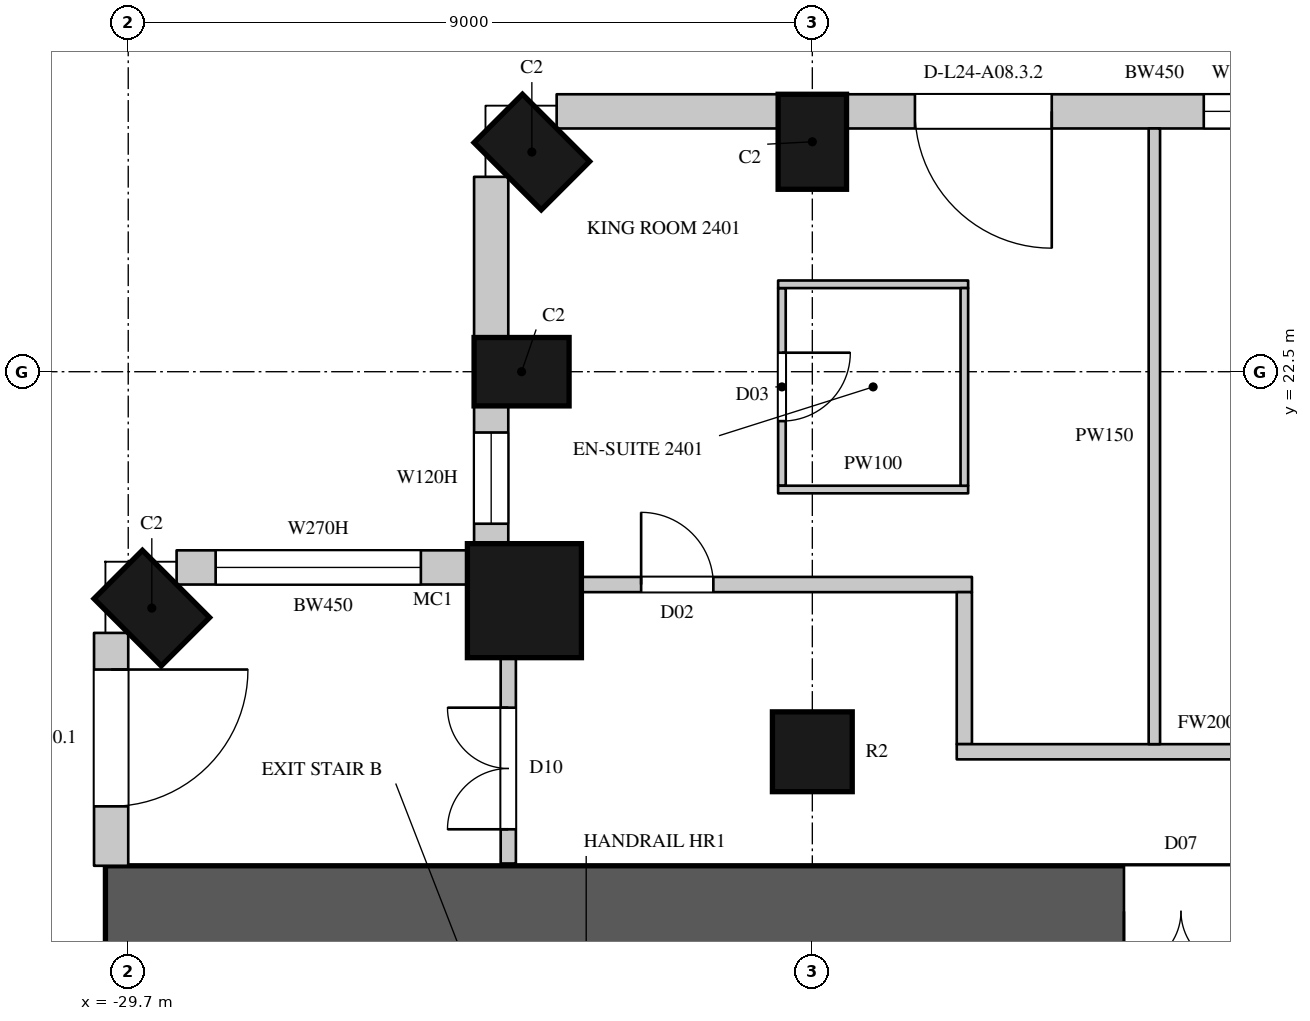
"""IFC4 building model, lengths in metres.
Left out: names, types, materials, properties, quantities, classifications, styles, units other than length and angle.
Written with IfcOpenShell. Run it as: python <this file> out.ifc"""

import sys

from ifc_helpers import new_model, si_unit, direction, frame, frame_2d, origin, origin_2d, place, context, subcontext, project, spatial, rectangle, circle, extrude, element, fill, save


model = new_model("IFC4")
c1 = context("Model", 3, precision=1e-05, world=origin(), true_north=direction((0.0, 1.0)))
c2 = subcontext(c1, "Body", "Model", "MODEL_VIEW")
j1 = project(units=[si_unit("LENGTHUNIT", "METRE"), si_unit("PLANEANGLEUNIT", "RADIAN")], contexts=[c1])
p1 = place(None, origin())
s1 = spatial("IfcSite", under=j1, at=p1, CompositionType="ELEMENT")
p2 = place(p1, origin())
s2 = spatial("IfcBuilding", under=s1, at=p2, CompositionType="ELEMENT")
p3 = place(p2, frame((0.0, 0.0, 116.7)))
s3 = spatial("IfcBuildingStorey", under=s2, at=p3, CompositionType="ELEMENT", Elevation=116.7)
for number, where, z_axis, x_axis in (
    (1, (-29.39, 19.39, 0.0), (0.0, 0.0, 1.0), (-0.707, -0.707, 0.0)),
    (2, (-20.7, 25.525, 0.0), (0.0, 0.0, 1.0), (-1.0, 0.0, 0.0)),
    (3, (-24.39, 25.39, 0.0), (0.0, 0.0, 1.0), (-0.707, -0.707, 0.0)),
    (4, (-24.525, 22.5, 0.0), (0.0, 0.0, 1.0), (0.0, -1.0, 0.0)),
):
    element("IfcColumn", number, at=place(p3, frame(where, z_axis=z_axis, x_axis=x_axis)), inside=s3, PredefinedType="COLUMN", context=c2, shape_type="SweptSolid", body=[
        extrude(rectangle(XDim=0.9, YDim=1.25, at=origin_2d()), origin(), (0.0, 0.0, 1.0), 3.6),
    ])
p4 = place(p3, frame((-24.488, 19.488, 0.0), z_axis=(0.0, 0.0, 1.0), x_axis=(1.0, 0.0, 0.0)))
e5 = element("IfcColumn", 5, at=p4, inside=s3, PredefinedType="COLUMN", context=c2, shape_type="SweptSolid", body=[
    extrude(circle(Radius=0.75, at=origin_2d()), origin(), (0.0, 0.0, 1.0), 3.6),
])
p5 = place(p3, frame((-20.7, 17.5, 0.0), z_axis=(0.0, 0.0, 1.0), x_axis=(1.0, 0.0, 0.0)))
e6 = element("IfcColumn", 6, at=p5, inside=s3, PredefinedType="COLUMN", context=c2, shape_type="SweptSolid", body=[
    extrude(circle(Radius=0.525, at=origin_2d()), origin(), (0.0, 0.0, 1.0), 3.6),
])
p6 = place(p3, frame((-29.925, 19.064, 0.0), z_axis=(0.0, 0.0, 1.0), x_axis=(0.0, -1.0, 0.0)))
e7 = element("IfcWall", 7, at=p6, inside=s3, PredefinedType="SOLIDWALL", context=c2, shape_type="SweptSolid", body=[
    extrude(rectangle(XDim=3.064, YDim=0.45, at=frame_2d((1.532, 0.0))), origin(), (0.0, 0.0, 1.0), 3.3),
])
p7 = place(p6, frame((0.482, 0.0, 0.0)))
e8 = element("IfcOpeningElement", 8, at=p7, cuts=e7, PredefinedType="OPENING", context=c2, shape_type="SweptSolid", body=[
    extrude(rectangle(XDim=1.8, YDim=2.4, at=frame_2d((0.9, 1.2))), frame((0.0, 0.235, 0.0), z_axis=(0.0, -1.0, 0.0), x_axis=(1.0, 0.0, 0.0)), (0.0, 0.0, 1.0), 0.47),
])
p8 = place(p3, frame((-12.15, 25.925, 0.0), z_axis=(0.0, 0.0, 1.0), x_axis=(-1.0, 0.0, 0.0)))
e9 = element("IfcWall", 9, at=p8, inside=s3, PredefinedType="SOLIDWALL", context=c2, shape_type="SweptSolid", body=[
    extrude(rectangle(XDim=8.1, YDim=0.45, at=frame_2d((4.05, 0.0))), origin(), (0.0, 0.0, 1.0), 3.3),
])
p9 = place(p8, frame((0.2, 0.0, 0.0)))
e10 = element("IfcOpeningElement", 10, at=p9, cuts=e9, PredefinedType="OPENING", context=c2, shape_type="SweptSolid", body=[
    extrude(rectangle(XDim=1.8, YDim=2.4, at=frame_2d((0.9, 1.2))), frame((0.0, 0.235, 0.0), z_axis=(0.0, -1.0, 0.0), x_axis=(1.0, 0.0, 0.0)), (0.0, 0.0, 1.0), 0.47),
])
p10 = place(p8, frame((2.2, 0.0, 1.05)))
e11 = element("IfcOpeningElement", 11, at=p10, cuts=e9, PredefinedType="OPENING", context=c2, shape_type="SweptSolid", body=[
    extrude(rectangle(XDim=1.2, YDim=2.0, at=frame_2d((0.6, 1.0))), frame((0.0, 0.235, 0.0), z_axis=(0.0, -1.0, 0.0), x_axis=(1.0, 0.0, 0.0)), (0.0, 0.0, 1.0), 0.47),
])
p11 = place(p8, frame((5.4, 0.0, 0.0)))
e12 = element("IfcOpeningElement", 12, at=p11, cuts=e9, PredefinedType="OPENING", context=c2, shape_type="SweptSolid", body=[
    extrude(rectangle(XDim=1.8, YDim=2.4, at=frame_2d((0.9, 1.2))), frame((0.0, 0.235, 0.0), z_axis=(0.0, -1.0, 0.0), x_axis=(1.0, 0.0, 0.0)), (0.0, 0.0, 1.0), 0.47),
])
p12 = place(p3, frame((-21.15, 25.925, 0.0), z_axis=(0.0, 0.0, 1.0), x_axis=(-1.0, 0.0, 0.0)))
e13 = element("IfcWall", 13, at=p12, inside=s3, PredefinedType="SOLIDWALL", context=c2, shape_type="SweptSolid", body=[
    extrude(rectangle(XDim=2.914, YDim=0.45, at=frame_2d((1.457, 0.0))), origin(), (0.0, 0.0, 1.0), 3.3),
])
p13 = place(p3, frame((-24.925, 25.064, 0.0), z_axis=(0.0, 0.0, 1.0), x_axis=(0.0, -1.0, 0.0)))
e14 = element("IfcWall", 14, at=p13, inside=s3, PredefinedType="SOLIDWALL", context=c2, shape_type="SweptSolid", body=[
    extrude(rectangle(XDim=2.114, YDim=0.45, at=frame_2d((1.057, 0.0))), origin(), (0.0, 0.0, 1.0), 3.3),
])
p14 = place(p3, frame((-24.925, 22.05, 0.0), z_axis=(0.0, 0.0, 1.0), x_axis=(0.0, -1.0, 0.0)))
e15 = element("IfcWall", 15, at=p14, inside=s3, PredefinedType="SOLIDWALL", context=c2, shape_type="SweptSolid", body=[
    extrude(rectangle(XDim=1.843, YDim=0.45, at=frame_2d((0.921, 0.0))), origin(), (0.0, 0.0, 1.0), 3.3),
])
p15 = place(p14, frame((0.35, 0.0, 1.05)))
e16 = element("IfcOpeningElement", 16, at=p15, cuts=e15, PredefinedType="OPENING", context=c2, shape_type="SweptSolid", body=[
    extrude(rectangle(XDim=1.2, YDim=2.0, at=frame_2d((0.6, 1.0))), frame((0.0, 0.235, 0.0), z_axis=(0.0, -1.0, 0.0), x_axis=(1.0, 0.0, 0.0)), (0.0, 0.0, 1.0), 0.47),
])
p16 = place(p3, frame((-25.207, 19.925, 0.0), z_axis=(0.0, 0.0, 1.0), x_axis=(-1.0, 0.0, 0.0)))
e17 = element("IfcWall", 17, at=p16, inside=s3, PredefinedType="SOLIDWALL", context=c2, shape_type="SweptSolid", body=[
    extrude(rectangle(XDim=3.857, YDim=0.45, at=frame_2d((1.928, 0.0))), origin(), (0.0, 0.0, 1.0), 3.3),
])
p17 = place(p16, frame((0.643, 0.0, 1.05)))
e18 = element("IfcOpeningElement", 18, at=p17, cuts=e17, PredefinedType="OPENING", context=c2, shape_type="SweptSolid", body=[
    extrude(rectangle(XDim=2.7, YDim=2.0, at=frame_2d((1.35, 1.0))), frame((0.0, 0.235, 0.0), z_axis=(0.0, -1.0, 0.0), x_axis=(1.0, 0.0, 0.0)), (0.0, 0.0, 1.0), 0.47),
])
p18 = place(p3, frame((-30.0, 15.4, 0.0), z_axis=(0.0, 0.0, 1.0), x_axis=(1.0, 0.0, 0.0)))
e19 = element("IfcWall", 19, at=p18, inside=s3, PredefinedType="SHEAR", context=c2, shape_type="SweptSolid", body=[
    extrude(rectangle(XDim=16.0, YDim=1.2, at=frame_2d((8.0, 0.0))), origin(), (0.0, 0.0, 1.0), 3.6),
])
p19 = place(p18, frame((13.4, 0.0, 0.0)))
e20 = element("IfcOpeningElement", 20, at=p19, cuts=e19, PredefinedType="OPENING", context=c2, shape_type="SweptSolid", body=[
    extrude(rectangle(XDim=1.5, YDim=2.4, at=frame_2d((0.75, 1.2))), frame((0.0, 0.61, 0.0), z_axis=(0.0, -1.0, 0.0), x_axis=(1.0, 0.0, 0.0)), (0.0, 0.0, 1.0), 1.22),
])
p20 = place(p3, frame((-24.7, 16.03, 0.0), z_axis=(0.0, 0.0, 1.0), x_axis=(0.0, 1.0, 0.0)))
e21 = element("IfcWall", 21, at=p20, inside=s3, PredefinedType="PARTITIONING", context=c2, shape_type="SweptSolid", body=[
    extrude(rectangle(XDim=2.722, YDim=0.2, at=frame_2d((1.361, 0.0))), origin(), (0.0, 0.0, 1.0), 3.3),
])
p21 = place(p20, frame((0.45, 0.0, 0.0)))
e22 = element("IfcOpeningElement", 22, at=p21, cuts=e21, PredefinedType="OPENING", context=c2, shape_type="SweptSolid", body=[
    extrude(rectangle(XDim=1.6, YDim=2.4, at=frame_2d((0.8, 1.2))), frame((0.0, 0.11, 0.0), z_axis=(0.0, -1.0, 0.0), x_axis=(1.0, 0.0, 0.0)), (0.0, 0.0, 1.0), 0.22),
])
p22 = place(p3, frame((-23.752, 19.7, 0.0), z_axis=(0.0, 0.0, 1.0), x_axis=(1.0, 0.0, 0.0)))
e23 = element("IfcWall", 23, at=p22, inside=s3, PredefinedType="PARTITIONING", context=c2, shape_type="SweptSolid", body=[
    extrude(rectangle(XDim=5.152, YDim=0.2, at=frame_2d((2.576, 0.0))), origin(), (0.0, 0.0, 1.0), 3.3),
])
p23 = place(p22, frame((0.8, 0.0, 0.0)))
e24 = element("IfcOpeningElement", 24, at=p23, cuts=e23, PredefinedType="OPENING", context=c2, shape_type="SweptSolid", body=[
    extrude(rectangle(XDim=0.95, YDim=2.2, at=frame_2d((0.475, 1.1))), frame((0.0, 0.11, 0.0), z_axis=(0.0, -1.0, 0.0), x_axis=(1.0, 0.0, 0.0)), (0.0, 0.0, 1.0), 0.22),
])
p24 = place(p3, frame((-18.7, 17.6, 0.0), z_axis=(0.0, 0.0, 1.0), x_axis=(0.0, 1.0, 0.0)))
e25 = element("IfcWall", 25, at=p24, inside=s3, PredefinedType="PARTITIONING", context=c2, shape_type="SweptSolid", body=[
    extrude(rectangle(XDim=2.0, YDim=0.2, at=frame_2d((1.0, 0.0))), origin(), (0.0, 0.0, 1.0), 3.3),
])
p25 = place(p3, frame((-18.8, 17.5, 0.0), z_axis=(0.0, 0.0, 1.0), x_axis=(1.0, 0.0, 0.0)))
e26 = element("IfcWall", 26, at=p25, inside=s3, PredefinedType="PARTITIONING", context=c2, shape_type="SweptSolid", body=[
    extrude(rectangle(XDim=6.575, YDim=0.2, at=frame_2d((3.288, 0.0))), origin(), (0.0, 0.0, 1.0), 2.75),
])
p26 = place(p25, frame((3.85, 0.0, 0.0)))
e27 = element("IfcOpeningElement", 27, at=p26, cuts=e26, PredefinedType="OPENING", context=c2, shape_type="SweptSolid", body=[
    extrude(rectangle(XDim=1.1, YDim=2.4, at=frame_2d((0.55, 1.2))), frame((0.0, 0.11, 0.0), z_axis=(0.0, -1.0, 0.0), x_axis=(1.0, 0.0, 0.0)), (0.0, 0.0, 1.0), 0.22),
])
p27 = place(p3, frame((-16.2, 17.6, 0.0), z_axis=(0.0, 0.0, 1.0), x_axis=(0.0, 1.0, 0.0)))
e28 = element("IfcWall", 28, at=p27, inside=s3, PredefinedType="PARTITIONING", context=c2, shape_type="SweptSolid", body=[
    extrude(rectangle(XDim=8.1, YDim=0.15, at=frame_2d((4.05, 0.0))), origin(), (0.0, 0.0, 1.0), 2.65),
])
p28 = place(p3, frame((-21.1, 21.0, 0.0), z_axis=(0.0, 0.0, 1.0), x_axis=(0.0, 1.0, 0.0)))
e29 = element("IfcWall", 29, at=p28, inside=s3, PredefinedType="PARTITIONING", context=c2, shape_type="SweptSolid", body=[
    extrude(rectangle(XDim=2.6, YDim=0.1, at=frame_2d((1.3, 0.0))), origin(), (0.0, 0.0, 1.0), 3.3),
])
p29 = place(p28, frame((0.85, 0.0, 0.0)))
e30 = element("IfcOpeningElement", 30, at=p29, cuts=e29, PredefinedType="OPENING", context=c2, shape_type="SweptSolid", body=[
    extrude(rectangle(XDim=0.9, YDim=2.2, at=frame_2d((0.45, 1.1))), frame((0.0, 0.06, 0.0), z_axis=(0.0, -1.0, 0.0), x_axis=(1.0, 0.0, 0.0)), (0.0, 0.0, 1.0), 0.12),
])
for number, where, z_axis, x_axis in (
    (31, (-21.15, 20.95, 0.0), (0.0, 0.0, 1.0), (1.0, 0.0, 0.0)),
    (32, (-21.15, 23.65, 0.0), (0.0, 0.0, 1.0), (1.0, 0.0, 0.0)),
):
    element("IfcWall", number, at=place(p3, frame(where, z_axis=z_axis, x_axis=x_axis)), inside=s3, PredefinedType="PARTITIONING", context=c2, shape_type="SweptSolid", body=[
        extrude(rectangle(XDim=2.5, YDim=0.1, at=frame_2d((1.25, 0.0))), origin(), (0.0, 0.0, 1.0), 3.3),
    ])
p30 = place(p3, frame((-18.7, 21.0, 0.0), z_axis=(0.0, 0.0, 1.0), x_axis=(0.0, 1.0, 0.0)))
e33 = element("IfcWall", 33, at=p30, inside=s3, PredefinedType="PARTITIONING", context=c2, shape_type="SweptSolid", body=[
    extrude(rectangle(XDim=2.6, YDim=0.1, at=frame_2d((1.3, 0.0))), origin(), (0.0, 0.0, 1.0), 3.3),
])
p31 = place(p7, origin())
e34 = element("IfcDoor", 34, at=p31, inside=s3, OperationType="SLIDING_TO_LEFT", PredefinedType="DOOR", context=c2, shape_type="SweptSolid", body=[
    extrude(rectangle(XDim=1.8, YDim=2.4, at=frame_2d((0.9, 1.2))), frame((0.0, 0.13, 0.0), z_axis=(0.0, -1.0, 0.0), x_axis=(1.0, 0.0, 0.0)), (0.0, 0.0, 1.0), 0.05),
])
fill(e8, e34)
p32 = place(p10, origin())
e35 = element("IfcWindow", 35, at=p32, inside=s3, PartitioningType="SINGLE_PANEL", PredefinedType="WINDOW", context=c2, shape_type="SweptSolid", body=[
    extrude(rectangle(XDim=1.2, YDim=2.0, at=frame_2d((0.6, 1.0))), frame((0.0, 0.135, 0.0), z_axis=(0.0, -1.0, 0.0), x_axis=(1.0, 0.0, 0.0)), (0.0, 0.0, 1.0), 0.06),
])
fill(e11, e35)
p33 = place(p11, origin())
e36 = element("IfcDoor", 36, at=p33, inside=s3, OperationType="SLIDING_TO_LEFT", PredefinedType="DOOR", context=c2, shape_type="SweptSolid", body=[
    extrude(rectangle(XDim=1.8, YDim=2.4, at=frame_2d((0.9, 1.2))), frame((0.0, 0.13, 0.0), z_axis=(0.0, -1.0, 0.0), x_axis=(1.0, 0.0, 0.0)), (0.0, 0.0, 1.0), 0.05),
])
fill(e12, e36)
p34 = place(p15, origin())
e37 = element("IfcWindow", 37, at=p34, inside=s3, PartitioningType="SINGLE_PANEL", PredefinedType="WINDOW", context=c2, shape_type="SweptSolid", body=[
    extrude(rectangle(XDim=1.2, YDim=2.0, at=frame_2d((0.6, 1.0))), frame((0.0, 0.135, 0.0), z_axis=(0.0, -1.0, 0.0), x_axis=(1.0, 0.0, 0.0)), (0.0, 0.0, 1.0), 0.06),
])
fill(e16, e37)
p35 = place(p17, origin())
e38 = element("IfcWindow", 38, at=p35, inside=s3, PartitioningType="SINGLE_PANEL", PredefinedType="WINDOW", context=c2, shape_type="SweptSolid", body=[
    extrude(rectangle(XDim=2.7, YDim=2.0, at=frame_2d((1.35, 1.0))), frame((0.0, 0.135, 0.0), z_axis=(0.0, -1.0, 0.0), x_axis=(1.0, 0.0, 0.0)), (0.0, 0.0, 1.0), 0.06),
])
fill(e18, e38)
p36 = place(p21, origin())
e39 = element("IfcDoor", 39, at=p36, inside=s3, OperationType="DOUBLE_DOOR_SINGLE_SWING", PredefinedType="DOOR", context=c2, shape_type="SweptSolid", body=[
    extrude(rectangle(XDim=1.6, YDim=2.4, at=frame_2d((0.8, 1.2))), frame((0.0, 0.025, 0.0), z_axis=(0.0, -1.0, 0.0), x_axis=(1.0, 0.0, 0.0)), (0.0, 0.0, 1.0), 0.05),
])
fill(e22, e39)
p37 = place(p23, origin())
e40 = element("IfcDoor", 40, at=p37, inside=s3, OperationType="SINGLE_SWING_LEFT", PredefinedType="DOOR", context=c2, shape_type="SweptSolid", body=[
    extrude(rectangle(XDim=0.95, YDim=2.2, at=frame_2d((0.475, 1.1))), frame((0.0, 0.025, 0.0), z_axis=(0.0, -1.0, 0.0), x_axis=(1.0, 0.0, 0.0)), (0.0, 0.0, 1.0), 0.05),
])
fill(e24, e40)
p38 = place(p29, origin())
e41 = element("IfcDoor", 41, at=p38, inside=s3, OperationType="SINGLE_SWING_LEFT", PredefinedType="DOOR", context=c2, shape_type="SweptSolid", body=[
    extrude(rectangle(XDim=0.9, YDim=2.2, at=frame_2d((0.45, 1.1))), frame((0.0, 0.025, 0.0), z_axis=(0.0, -1.0, 0.0), x_axis=(1.0, 0.0, 0.0)), (0.0, 0.0, 1.0), 0.05),
])
fill(e30, e41)
p39 = place(p19, origin())
e42 = element("IfcDoor", 42, at=p39, inside=s3, OperationType="DOUBLE_DOOR_SINGLE_SWING", PredefinedType="DOOR", context=c2, shape_type="SweptSolid", body=[
    extrude(rectangle(XDim=1.5, YDim=2.4, at=frame_2d((0.75, 1.2))), frame((0.0, 0.025, 0.0), z_axis=(0.0, -1.0, 0.0), x_axis=(1.0, 0.0, 0.0)), (0.0, 0.0, 1.0), 0.05),
])
fill(e20, e42)
save(model, sys.argv[1])
